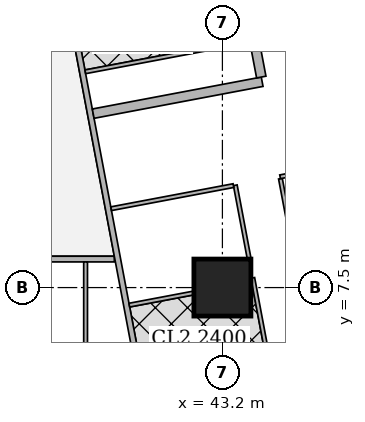
"""IFC4 building model, lengths in metres.
Left out: names, types, materials, properties, quantities, classifications, styles, units other than length and angle.
Written with IfcOpenShell. Run it as: python <this file> out.ifc"""

import sys

from ifc_helpers import new_model, si_unit, direction, frame, frame_2d, origin, origin_2d, place, context, subcontext, project, spatial, rectangle, extrude, element, fill, save


model = new_model("IFC4")
c1 = context("Model", 3, precision=1e-05, world=origin(), true_north=direction((0.0, 1.0)))
c2 = subcontext(c1, "Body", "Model", "MODEL_VIEW")
j1 = project(units=[si_unit("LENGTHUNIT", "METRE"), si_unit("PLANEANGLEUNIT", "RADIAN")], contexts=[c1])
p1 = place(None, origin())
s1 = spatial("IfcSite", under=j1, at=p1, CompositionType="ELEMENT")
p2 = place(p1, origin())
s2 = spatial("IfcBuilding", under=s1, at=p2, CompositionType="ELEMENT")
p3 = place(p2, frame((0.0, 0.0, 169.55)))
s3 = spatial("IfcBuildingStorey", under=s2, at=p3, CompositionType="ELEMENT", Elevation=169.55)
p4 = place(p3, frame((43.2, 7.5, 0.0), z_axis=(0.0, 0.0, 1.0), x_axis=(1.0, 0.0, 0.0)))
e1 = element("IfcColumn", 1, at=p4, inside=s3, PredefinedType="COLUMN", context=c2, shape_type="SweptSolid", body=[
    extrude(rectangle(XDim=1.5, YDim=1.5, at=origin_2d()), origin(), (0.0, 0.0, 1.0), 3.75),
])
p5 = place(p3, frame((50.653, 2.703, 0.0), z_axis=(0.0, 0.0, 1.0), x_axis=(-0.185612026696, 0.982623109613, 0.0)))
e2 = element("IfcWall", 2, at=p5, inside=s3, PredefinedType="SOLIDWALL", context=c2, shape_type="SweptSolid", body=[
    extrude(rectangle(XDim=41.393, YDim=0.2, at=frame_2d((20.697, 0.0))), origin(), (0.0, 0.0, 1.0), 3.5),
])
p6 = place(p5, frame((1.633, 0.0, 0.9)))
e3 = element("IfcOpeningElement", 3, at=p6, cuts=e2, PredefinedType="OPENING", context=c2, shape_type="SweptSolid", body=[
    extrude(rectangle(XDim=1.8, YDim=1.5, at=frame_2d((0.9, 0.75))), frame((0.0, 0.11, 0.0), z_axis=(0.0, -1.0, 0.0), x_axis=(1.0, 0.0, 0.0)), (0.0, 0.0, 1.0), 0.22),
])
p7 = place(p5, frame((6.032, 0.0, 0.9)))
e4 = element("IfcOpeningElement", 4, at=p7, cuts=e2, PredefinedType="OPENING", context=c2, shape_type="SweptSolid", body=[
    extrude(rectangle(XDim=1.8, YDim=1.5, at=frame_2d((0.9, 0.75))), frame((0.0, 0.11, 0.0), z_axis=(0.0, -1.0, 0.0), x_axis=(1.0, 0.0, 0.0)), (0.0, 0.0, 1.0), 0.22),
])
p8 = place(p5, frame((9.848, 0.0, 0.9)))
e5 = element("IfcOpeningElement", 5, at=p8, cuts=e2, PredefinedType="OPENING", context=c2, shape_type="SweptSolid", body=[
    extrude(rectangle(XDim=1.8, YDim=1.5, at=frame_2d((0.9, 0.75))), frame((0.0, 0.11, 0.0), z_axis=(0.0, -1.0, 0.0), x_axis=(1.0, 0.0, 0.0)), (0.0, 0.0, 1.0), 0.22),
])
p9 = place(p5, frame((13.664, 0.0, 0.9)))
e6 = element("IfcOpeningElement", 6, at=p9, cuts=e2, PredefinedType="OPENING", context=c2, shape_type="SweptSolid", body=[
    extrude(rectangle(XDim=1.8, YDim=1.5, at=frame_2d((0.9, 0.75))), frame((0.0, 0.11, 0.0), z_axis=(0.0, -1.0, 0.0), x_axis=(1.0, 0.0, 0.0)), (0.0, 0.0, 1.0), 0.22),
])
p10 = place(p5, frame((17.481, 0.0, 0.9)))
e7 = element("IfcOpeningElement", 7, at=p10, cuts=e2, PredefinedType="OPENING", context=c2, shape_type="SweptSolid", body=[
    extrude(rectangle(XDim=1.8, YDim=1.5, at=frame_2d((0.9, 0.75))), frame((0.0, 0.11, 0.0), z_axis=(0.0, -1.0, 0.0), x_axis=(1.0, 0.0, 0.0)), (0.0, 0.0, 1.0), 0.22),
])
p11 = place(p5, frame((21.297, 0.0, 0.9)))
e8 = element("IfcOpeningElement", 8, at=p11, cuts=e2, PredefinedType="OPENING", context=c2, shape_type="SweptSolid", body=[
    extrude(rectangle(XDim=1.8, YDim=1.5, at=frame_2d((0.9, 0.75))), frame((0.0, 0.11, 0.0), z_axis=(0.0, -1.0, 0.0), x_axis=(1.0, 0.0, 0.0)), (0.0, 0.0, 1.0), 0.22),
])
p12 = place(p5, frame((25.113, 0.0, 0.9)))
e9 = element("IfcOpeningElement", 9, at=p12, cuts=e2, PredefinedType="OPENING", context=c2, shape_type="SweptSolid", body=[
    extrude(rectangle(XDim=1.8, YDim=1.5, at=frame_2d((0.9, 0.75))), frame((0.0, 0.11, 0.0), z_axis=(0.0, -1.0, 0.0), x_axis=(1.0, 0.0, 0.0)), (0.0, 0.0, 1.0), 0.22),
])
p13 = place(p5, frame((28.93, 0.0, 0.9)))
e10 = element("IfcOpeningElement", 10, at=p13, cuts=e2, PredefinedType="OPENING", context=c2, shape_type="SweptSolid", body=[
    extrude(rectangle(XDim=1.8, YDim=1.5, at=frame_2d((0.9, 0.75))), frame((0.0, 0.11, 0.0), z_axis=(0.0, -1.0, 0.0), x_axis=(1.0, 0.0, 0.0)), (0.0, 0.0, 1.0), 0.22),
])
p14 = place(p5, frame((32.746, 0.0, 0.9)))
e11 = element("IfcOpeningElement", 11, at=p14, cuts=e2, PredefinedType="OPENING", context=c2, shape_type="SweptSolid", body=[
    extrude(rectangle(XDim=1.8, YDim=1.5, at=frame_2d((0.9, 0.75))), frame((0.0, 0.11, 0.0), z_axis=(0.0, -1.0, 0.0), x_axis=(1.0, 0.0, 0.0)), (0.0, 0.0, 1.0), 0.22),
])
p15 = place(p5, frame((36.481, 0.0, 0.9)))
e12 = element("IfcOpeningElement", 12, at=p15, cuts=e2, PredefinedType="OPENING", context=c2, shape_type="SweptSolid", body=[
    extrude(rectangle(XDim=1.8, YDim=1.5, at=frame_2d((0.9, 0.75))), frame((0.0, 0.11, 0.0), z_axis=(0.0, -1.0, 0.0), x_axis=(1.0, 0.0, 0.0)), (0.0, 0.0, 1.0), 0.22),
])
p16 = place(p3, frame((40.356, 8.25, 0.0), z_axis=(0.0, 0.0, 1.0), x_axis=(-1.0, 0.0, 0.0)))
e13 = element("IfcWall", 13, at=p16, inside=s3, PredefinedType="SOLIDWALL", context=c2, shape_type="SweptSolid", body=[
    extrude(rectangle(XDim=3.605, YDim=0.15, at=frame_2d((1.802, 0.0))), origin(), (0.0, 0.0, 1.0), 3.5),
])
p17 = place(p3, frame((33.877, 43.029, 0.0), z_axis=(0.0, 0.0, 1.0), x_axis=(0.185596841028, -0.98262597798, 0.0)))
e14 = element("IfcWall", 14, at=p17, inside=s3, PredefinedType="SOLIDWALL", context=c2, shape_type="SweptSolid", body=[
    extrude(rectangle(XDim=41.66, YDim=0.15, at=frame_2d((20.83, 0.0))), origin(), (0.0, 0.0, 1.0), 2.5),
])
p18 = place(p17, frame((8.63, 0.0, 0.0)))
e15 = element("IfcOpeningElement", 15, at=p18, cuts=e14, PredefinedType="OPENING", context=c2, shape_type="SweptSolid", body=[
    extrude(rectangle(XDim=1.0, YDim=2.1, at=frame_2d((0.5, 1.05))), frame((0.0, 0.085, 0.0), z_axis=(0.0, -1.0, 0.0), x_axis=(1.0, 0.0, 0.0)), (0.0, 0.0, 1.0), 0.17),
])
p19 = place(p17, frame((13.841, 0.0, 0.0)))
e16 = element("IfcOpeningElement", 16, at=p19, cuts=e14, PredefinedType="OPENING", context=c2, shape_type="SweptSolid", body=[
    extrude(rectangle(XDim=1.0, YDim=2.1, at=frame_2d((0.5, 1.05))), frame((0.0, 0.085, 0.0), z_axis=(0.0, -1.0, 0.0), x_axis=(1.0, 0.0, 0.0)), (0.0, 0.0, 1.0), 0.17),
])
p20 = place(p17, frame((21.474, 0.0, 0.0)))
e17 = element("IfcOpeningElement", 17, at=p20, cuts=e14, PredefinedType="OPENING", context=c2, shape_type="SweptSolid", body=[
    extrude(rectangle(XDim=1.0, YDim=2.1, at=frame_2d((0.5, 1.05))), frame((0.0, 0.085, 0.0), z_axis=(0.0, -1.0, 0.0), x_axis=(1.0, 0.0, 0.0)), (0.0, 0.0, 1.0), 0.17),
])
p21 = place(p17, frame((30.4, 0.0, 0.0)))
e18 = element("IfcOpeningElement", 18, at=p21, cuts=e14, PredefinedType="OPENING", context=c2, shape_type="SweptSolid", body=[
    extrude(rectangle(XDim=1.0, YDim=2.1, at=frame_2d((0.5, 1.05))), frame((0.0, 0.085, 0.0), z_axis=(0.0, -1.0, 0.0), x_axis=(1.0, 0.0, 0.0)), (0.0, 0.0, 1.0), 0.17),
])
p22 = place(p17, frame((32.288, 0.0, 0.0)))
e19 = element("IfcOpeningElement", 19, at=p22, cuts=e14, PredefinedType="OPENING", context=c2, shape_type="SweptSolid", body=[
    extrude(rectangle(XDim=1.0, YDim=2.1, at=frame_2d((0.5, 1.05))), frame((0.0, 0.085, 0.0), z_axis=(0.0, -1.0, 0.0), x_axis=(1.0, 0.0, 0.0)), (0.0, 0.0, 1.0), 0.17),
])
p23 = place(p3, frame((39.6, 4.9, 0.0), z_axis=(0.0, 0.0, 1.0), x_axis=(0.0, 1.0, 0.0)))
e20 = element("IfcWall", 20, at=p23, inside=s3, PredefinedType="PARTITIONING", context=c2, shape_type="SweptSolid", body=[
    extrude(rectangle(XDim=3.275, YDim=0.1, at=frame_2d((1.638, 0.0))), origin(), (0.0, 0.0, 1.0), 3.5),
])
p24 = place(p3, frame((42.81, 13.785, 0.0), z_axis=(0.0, 0.0, 1.0), x_axis=(-0.982620626894, -0.185625169636, 0.0)))
e21 = element("IfcWall", 21, at=p24, inside=s3, PredefinedType="PARTITIONING", context=c2, shape_type="SweptSolid", body=[
    extrude(rectangle(XDim=3.275, YDim=0.1, at=frame_2d((1.637, 0.0))), origin(), (0.0, 0.0, 1.0), 3.5),
])
p25 = place(p24, frame((1.201, 0.0, 0.0)))
e22 = element("IfcOpeningElement", 22, at=p25, cuts=e21, PredefinedType="OPENING", context=c2, shape_type="SweptSolid", body=[
    extrude(rectangle(XDim=0.9, YDim=2.1, at=frame_2d((0.45, 1.05))), frame((0.0, 0.06, 0.0), z_axis=(0.0, -1.0, 0.0), x_axis=(1.0, 0.0, 0.0)), (0.0, 0.0, 1.0), 0.12),
])
p26 = place(p3, frame((44.727, 10.366, 0.0), z_axis=(0.0, 0.0, 1.0), x_axis=(0.185578957652, -0.982629355595, 0.0)))
e23 = element("IfcWall", 23, at=p26, inside=s3, PredefinedType="PARTITIONING", context=c2, shape_type="SweptSolid", body=[
    extrude(rectangle(XDim=7.721, YDim=0.1, at=frame_2d((3.86, 0.0))), origin(), (0.0, 0.0, 1.0), 3.5),
])
p27 = place(p26, frame((0.151, 0.0, 0.0)))
e24 = element("IfcOpeningElement", 24, at=p27, cuts=e23, PredefinedType="OPENING", context=c2, shape_type="SweptSolid", body=[
    extrude(rectangle(XDim=0.9, YDim=2.1, at=frame_2d((0.45, 1.05))), frame((0.0, 0.06, 0.0), z_axis=(0.0, -1.0, 0.0), x_axis=(1.0, 0.0, 0.0)), (0.0, 0.0, 1.0), 0.12),
])
p28 = place(p26, frame((3.806, 0.0, 0.0)))
e25 = element("IfcOpeningElement", 25, at=p28, cuts=e23, PredefinedType="OPENING", context=c2, shape_type="SweptSolid", body=[
    extrude(rectangle(XDim=0.9, YDim=2.1, at=frame_2d((0.45, 1.05))), frame((0.0, 0.06, 0.0), z_axis=(0.0, -1.0, 0.0), x_axis=(1.0, 0.0, 0.0)), (0.0, 0.0, 1.0), 0.12),
])
p29 = place(p3, frame((43.539, 10.192, 0.0), z_axis=(0.0, 0.0, 1.0), x_axis=(0.18564540894, -0.982616803306, 0.0)))
e26 = element("IfcWall", 26, at=p29, inside=s3, PredefinedType="PARTITIONING", context=c2, shape_type="SweptSolid", body=[
    extrude(rectangle(XDim=1.966, YDim=0.1, at=frame_2d((0.983, 0.0))), origin(), (0.0, 0.0, 1.0), 3.5),
])
p30 = place(p3, frame((43.999, 7.755, 0.0), z_axis=(0.0, 0.0, 1.0), x_axis=(0.185565904578, -0.982631820703, 0.0)))
e27 = element("IfcWall", 27, at=p30, inside=s3, PredefinedType="PARTITIONING", context=c2, shape_type="SweptSolid", body=[
    extrude(rectangle(XDim=5.319, YDim=0.1, at=frame_2d((2.66, 0.0))), origin(), (0.0, 0.0, 1.0), 3.5),
])
p31 = place(p30, frame((1.0, 0.0, 0.0)))
e28 = element("IfcOpeningElement", 28, at=p31, cuts=e27, PredefinedType="OPENING", context=c2, shape_type="SweptSolid", body=[
    extrude(rectangle(XDim=0.9, YDim=2.1, at=frame_2d((0.45, 1.05))), frame((0.0, 0.06, 0.0), z_axis=(0.0, -1.0, 0.0), x_axis=(1.0, 0.0, 0.0)), (0.0, 0.0, 1.0), 0.12),
])
p32 = place(p30, frame((4.269, 0.0, 0.0)))
e29 = element("IfcOpeningElement", 29, at=p32, cuts=e27, PredefinedType="OPENING", context=c2, shape_type="SweptSolid", body=[
    extrude(rectangle(XDim=0.9, YDim=2.1, at=frame_2d((0.45, 1.05))), frame((0.0, 0.06, 0.0), z_axis=(0.0, -1.0, 0.0), x_axis=(1.0, 0.0, 0.0)), (0.0, 0.0, 1.0), 0.12),
])
p33 = place(p30, frame((2.665, 0.0, 0.0)))
e30 = element("IfcOpeningElement", 30, at=p33, cuts=e27, PredefinedType="OPENING", context=c2, shape_type="SweptSolid", body=[
    extrude(rectangle(XDim=0.9, YDim=2.1, at=frame_2d((0.45, 1.05))), frame((0.0, 0.06, 0.0), z_axis=(0.0, -1.0, 0.0), x_axis=(1.0, 0.0, 0.0)), (0.0, 0.0, 1.0), 0.12),
])
p34 = place(p3, frame((48.943, 11.213, 0.0), z_axis=(0.0, 0.0, 1.0), x_axis=(-0.982633535512, -0.185556823879, 0.0)))
e31 = element("IfcWall", 31, at=p34, inside=s3, PredefinedType="PARTITIONING", context=c2, shape_type="SweptSolid", body=[
    extrude(rectangle(XDim=4.3, YDim=0.1, at=frame_2d((2.15, 0.0))), origin(), (0.0, 0.0, 1.0), 2.1),
])
p35 = place(p3, frame((43.49, 10.183, 0.0), z_axis=(0.0, 0.0, 1.0), x_axis=(-0.982607026909, -0.185697147715, 0.0)))
e32 = element("IfcWall", 32, at=p35, inside=s3, PredefinedType="PARTITIONING", context=c2, shape_type="SweptSolid", body=[
    extrude(rectangle(XDim=3.275, YDim=0.1, at=frame_2d((1.637, 0.0))), origin(), (0.0, 0.0, 1.0), 3.5),
])
p36 = place(p35, frame((1.2, 0.0, 0.0)))
e33 = element("IfcOpeningElement", 33, at=p36, cuts=e32, PredefinedType="OPENING", context=c2, shape_type="SweptSolid", body=[
    extrude(rectangle(XDim=0.9, YDim=2.1, at=frame_2d((0.45, 1.05))), frame((0.0, 0.06, 0.0), z_axis=(0.0, -1.0, 0.0), x_axis=(1.0, 0.0, 0.0)), (0.0, 0.0, 1.0), 0.12),
])
p37 = place(p3, frame((42.44, 7.357, 0.0), z_axis=(0.0, 0.0, 1.0), x_axis=(-0.982643094077, -0.185506198448, 0.0)))
e34 = element("IfcWall", 34, at=p37, inside=s3, PredefinedType="PARTITIONING", context=c2, shape_type="SweptSolid", body=[
    extrude(rectangle(XDim=1.719, YDim=0.1, at=frame_2d((0.859, 0.0))), origin(), (0.0, 0.0, 1.0), 3.5),
])
p38 = place(p3, frame((44.246, 12.916, 0.0), z_axis=(0.0, 0.0, 1.0), x_axis=(-0.982612837616, -0.185666398014, 0.0)))
e35 = element("IfcWall", 35, at=p38, inside=s3, PredefinedType="SOLIDWALL", context=c2, shape_type="SweptSolid", body=[
    extrude(rectangle(XDim=4.525, YDim=0.25, at=frame_2d((2.262, 0.0))), origin(), (0.0, 0.0, 1.0), 3.5),
])
p39 = place(p3, frame((44.003, 14.199, 0.0), z_axis=(0.0, 0.0, 1.0), x_axis=(0.186323326179, -0.982488482437, 0.0)))
e36 = element("IfcWall", 36, at=p39, inside=s3, PredefinedType="SOLIDWALL", context=c2, shape_type="SweptSolid", body=[
    extrude(rectangle(XDim=1.181, YDim=0.25, at=frame_2d((0.59, 0.0))), origin(), (0.0, 0.0, 1.0), 3.5),
])
p40 = place(p25, origin())
e37 = element("IfcDoor", 37, at=p40, inside=s3, OperationType="SINGLE_SWING_LEFT", PredefinedType="DOOR", context=c2, shape_type="SweptSolid", body=[
    extrude(rectangle(XDim=0.9, YDim=2.1, at=frame_2d((0.45, 1.05))), frame((0.0, 0.025, 0.0), z_axis=(0.0, -1.0, 0.0), x_axis=(1.0, 0.0, 0.0)), (0.0, 0.0, 1.0), 0.05),
])
fill(e22, e37)
p41 = place(p21, origin())
e38 = element("IfcDoor", 38, at=p41, inside=s3, OperationType="SINGLE_SWING_LEFT", PredefinedType="DOOR", context=c2, shape_type="SweptSolid", body=[
    extrude(rectangle(XDim=1.0, YDim=2.1, at=frame_2d((0.5, 1.05))), frame((0.0, 0.025, 0.0), z_axis=(0.0, -1.0, 0.0), x_axis=(1.0, 0.0, 0.0)), (0.0, 0.0, 1.0), 0.05),
])
fill(e18, e38)
p42 = place(p27, origin())
e39 = element("IfcDoor", 39, at=p42, inside=s3, OperationType="SINGLE_SWING_LEFT", PredefinedType="DOOR", context=c2, shape_type="SweptSolid", body=[
    extrude(rectangle(XDim=0.9, YDim=2.1, at=frame_2d((0.45, 1.05))), frame((0.0, 0.025, 0.0), z_axis=(0.0, -1.0, 0.0), x_axis=(1.0, 0.0, 0.0)), (0.0, 0.0, 1.0), 0.05),
])
fill(e24, e39)
p43 = place(p31, origin())
e40 = element("IfcDoor", 40, at=p43, inside=s3, OperationType="SINGLE_SWING_LEFT", PredefinedType="DOOR", context=c2, shape_type="SweptSolid", body=[
    extrude(rectangle(XDim=0.9, YDim=2.1, at=frame_2d((0.45, 1.05))), frame((0.0, 0.025, 0.0), z_axis=(0.0, -1.0, 0.0), x_axis=(1.0, 0.0, 0.0)), (0.0, 0.0, 1.0), 0.05),
])
fill(e28, e40)
p44 = place(p22, origin())
e41 = element("IfcDoor", 41, at=p44, inside=s3, OperationType="SINGLE_SWING_RIGHT", PredefinedType="DOOR", context=c2, shape_type="SweptSolid", body=[
    extrude(rectangle(XDim=1.0, YDim=2.1, at=frame_2d((0.5, 1.05))), frame((0.0, 0.025, 0.0), z_axis=(0.0, -1.0, 0.0), x_axis=(1.0, 0.0, 0.0)), (0.0, 0.0, 1.0), 0.05),
])
fill(e19, e41)
p45 = place(p36, origin())
e42 = element("IfcDoor", 42, at=p45, inside=s3, OperationType="SINGLE_SWING_LEFT", PredefinedType="DOOR", context=c2, shape_type="SweptSolid", body=[
    extrude(rectangle(XDim=0.9, YDim=2.1, at=frame_2d((0.45, 1.05))), frame((0.0, 0.025, 0.0), z_axis=(0.0, -1.0, 0.0), x_axis=(1.0, 0.0, 0.0)), (0.0, 0.0, 1.0), 0.05),
])
fill(e33, e42)
save(model, sys.argv[1])
